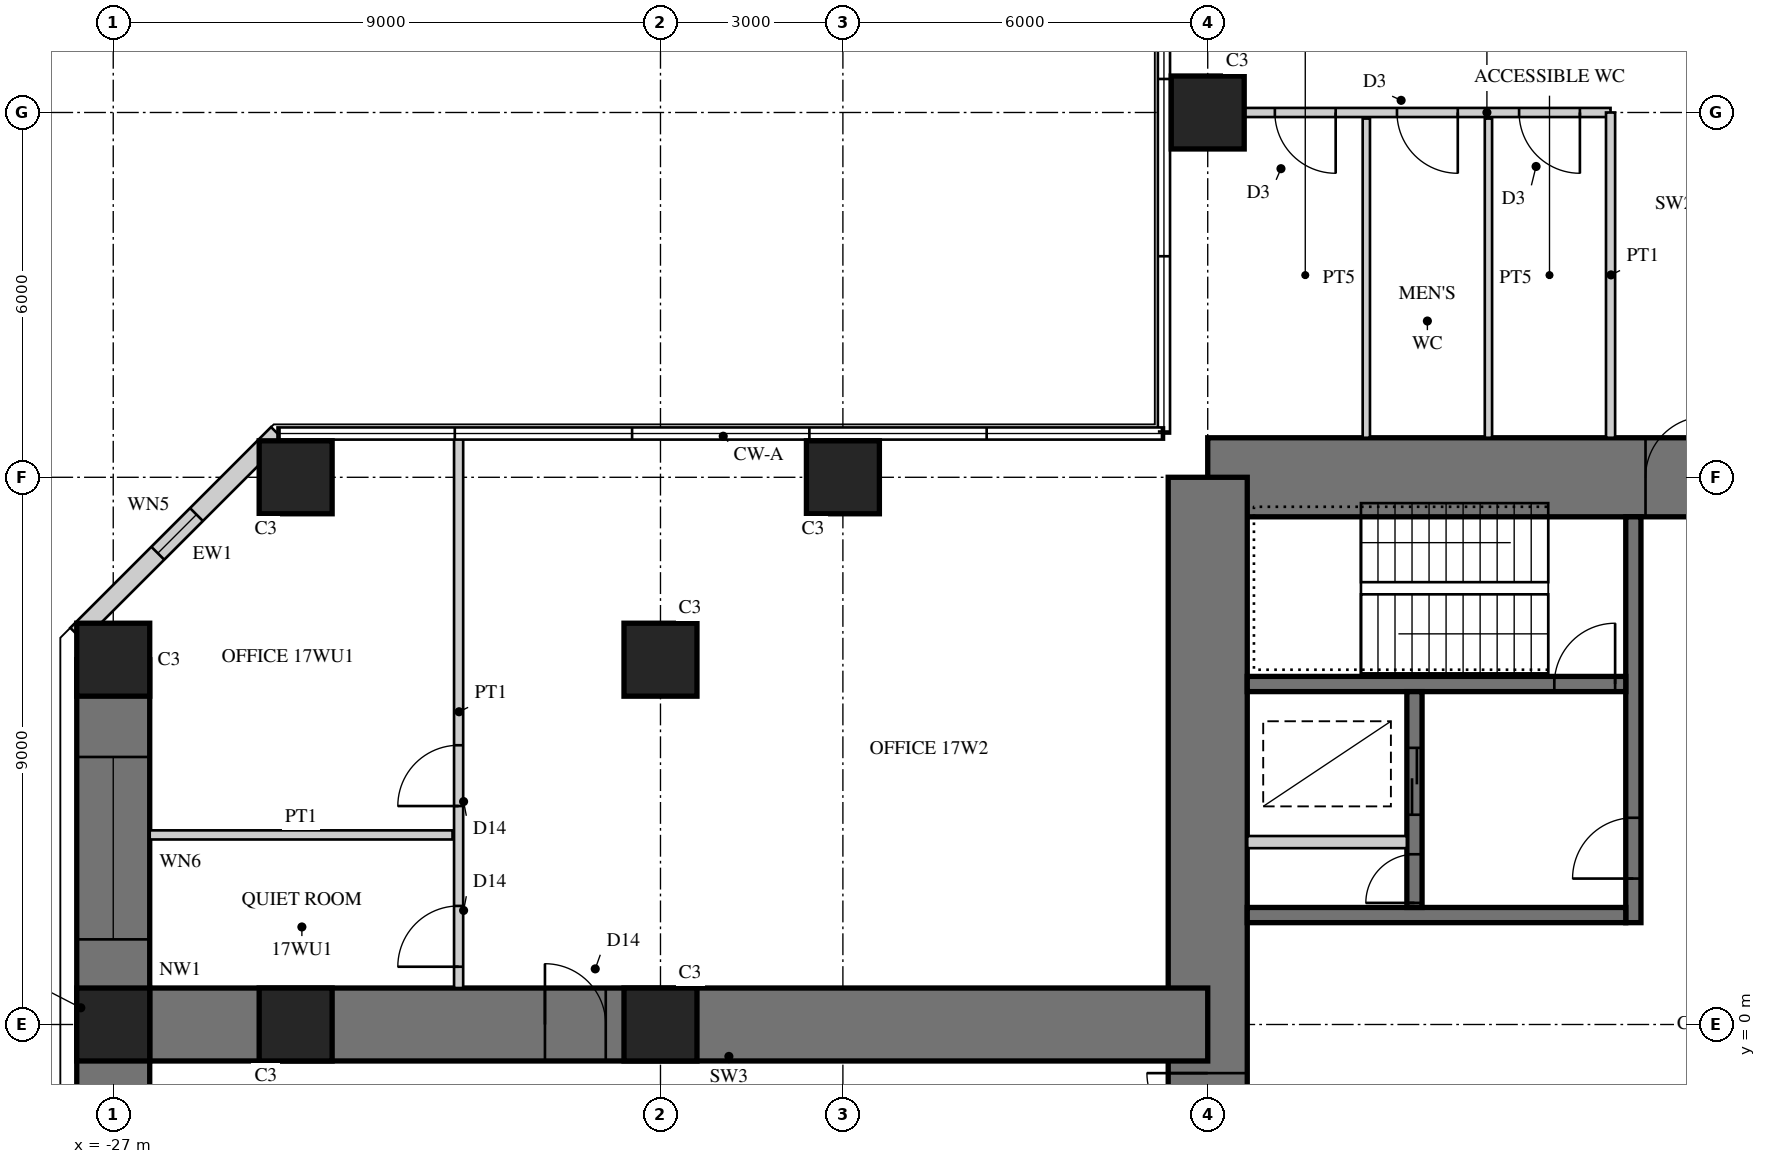
"""IFC4 building model, lengths in metres.
Left out: names, types, materials, properties, quantities, classifications, styles, units other than length and angle.
Written with IfcOpenShell. Run it as: python <this file> out.ifc"""

import sys

from ifc_helpers import new_model, si_unit, direction, frame, frame_2d, origin, origin_2d, place, context, subcontext, project, spatial, rectangle, hollow_rectangle, extrude, element, fill, save


model = new_model("IFC4")
c1 = context("Model", 3, precision=1e-05, world=origin(), true_north=direction((0.0, 1.0)))
c2 = subcontext(c1, "Body", "Model", "MODEL_VIEW")
j1 = project(units=[si_unit("LENGTHUNIT", "METRE"), si_unit("PLANEANGLEUNIT", "RADIAN")], contexts=[c1])
p1 = place(None, origin())
s1 = spatial("IfcSite", under=j1, at=p1, CompositionType="ELEMENT")
p2 = place(p1, origin())
s2 = spatial("IfcBuilding", under=s1, at=p2, CompositionType="ELEMENT")
p3 = place(p2, frame((0.0, 0.0, 71.5)))
s3 = spatial("IfcBuildingStorey", under=s2, at=p3, CompositionType="ELEMENT", Elevation=71.5)
p4 = place(p3, frame((9.0, 9.0, 0.0), z_axis=(0.0, 0.0, 1.0), x_axis=(-1.0, 0.0, 0.0)))
e1 = element("IfcWall", 1, at=p4, inside=s3, PredefinedType="SHEAR", context=c2, shape_type="SweptSolid", body=[
    extrude(rectangle(XDim=18.0, YDim=1.3, at=frame_2d((9.0, 0.0))), origin(), (0.0, 0.0, 1.0), 4.0),
])
p5 = place(p4, frame((9.8, 0.0, 0.0)))
e2 = element("IfcOpeningElement", 2, at=p5, cuts=e1, PredefinedType="OPENING", context=c2, shape_type="SweptSolid", body=[
    extrude(rectangle(XDim=1.0, YDim=2.4, at=frame_2d((0.5, 1.2))), frame((0.0, 0.66, 0.0), z_axis=(0.0, -1.0, 0.0), x_axis=(1.0, 0.0, 0.0)), (0.0, 0.0, 1.0), 1.32),
])
p6 = place(p3, frame((-9.0, 9.0, 0.0), z_axis=(0.0, 0.0, 1.0), x_axis=(0.0, -1.0, 0.0)))
e3 = element("IfcWall", 3, at=p6, inside=s3, PredefinedType="SHEAR", context=c2, shape_type="SweptSolid", body=[
    extrude(rectangle(XDim=18.0, YDim=1.3, at=frame_2d((9.0, 0.0))), origin(), (0.0, 0.0, 1.0), 4.0),
])
p7 = place(p6, frame((9.8, 0.0, 0.0)))
e4 = element("IfcOpeningElement", 4, at=p7, cuts=e3, PredefinedType="OPENING", context=c2, shape_type="SweptSolid", body=[
    extrude(rectangle(XDim=1.0, YDim=2.4, at=frame_2d((0.5, 1.2))), frame((0.0, 0.66, 0.0), z_axis=(0.0, -1.0, 0.0), x_axis=(1.0, 0.0, 0.0)), (0.0, 0.0, 1.0), 1.32),
])
p8 = place(p3, frame((-2.0, 1.675, 0.0), z_axis=(0.0, 0.0, 1.0), x_axis=(0.0, 1.0, 0.0)))
e5 = element("IfcWall", 5, at=p8, inside=s3, PredefinedType="SHEAR", context=c2, shape_type="SweptSolid", body=[
    extrude(rectangle(XDim=6.675, YDim=0.25, at=frame_2d((3.337, 0.0))), origin(), (0.0, 0.0, 1.0), 4.0),
])
p9 = place(p8, frame((0.725, 0.0, 0.0)))
e6 = element("IfcOpeningElement", 6, at=p9, cuts=e5, PredefinedType="OPENING", context=c2, shape_type="SweptSolid", body=[
    extrude(rectangle(XDim=1.0, YDim=2.1, at=frame_2d((0.5, 1.05))), frame((0.0, 0.135, 0.0), z_axis=(0.0, -1.0, 0.0), x_axis=(1.0, 0.0, 0.0)), (0.0, 0.0, 1.0), 0.27),
])
p10 = place(p3, frame((-2.125, 1.8, 0.0), z_axis=(0.0, 0.0, 1.0), x_axis=(-1.0, 0.0, 0.0)))
e7 = element("IfcWall", 7, at=p10, inside=s3, PredefinedType="SHEAR", context=c2, shape_type="SweptSolid", body=[
    extrude(rectangle(XDim=6.225, YDim=0.25, at=frame_2d((3.113, 0.0))), origin(), (0.0, 0.0, 1.0), 4.0),
])
p11 = place(p3, frame((-2.125, 5.6, 0.0), z_axis=(0.0, 0.0, 1.0), x_axis=(-1.0, 0.0, 0.0)))
e8 = element("IfcWall", 8, at=p11, inside=s3, PredefinedType="SHEAR", context=c2, shape_type="SweptSolid", body=[
    extrude(rectangle(XDim=6.225, YDim=0.25, at=frame_2d((3.113, 0.0))), origin(), (0.0, 0.0, 1.0), 4.0),
])
p12 = place(p11, frame((0.175, 0.0, 0.0)))
e9 = element("IfcOpeningElement", 9, at=p12, cuts=e8, PredefinedType="OPENING", context=c2, shape_type="SweptSolid", body=[
    extrude(rectangle(XDim=1.0, YDim=2.1, at=frame_2d((0.5, 1.05))), frame((0.0, 0.135, 0.0), z_axis=(0.0, -1.0, 0.0), x_axis=(1.0, 0.0, 0.0)), (0.0, 0.0, 1.0), 0.27),
])
p13 = place(p3, frame((-5.6, 1.925, 0.0), z_axis=(0.0, 0.0, 1.0), x_axis=(0.0, 1.0, 0.0)))
e10 = element("IfcWall", 10, at=p13, inside=s3, PredefinedType="SHEAR", context=c2, shape_type="SweptSolid", body=[
    extrude(rectangle(XDim=3.55, YDim=0.25, at=frame_2d((1.775, 0.0))), origin(), (0.0, 0.0, 1.0), 4.0),
])
p14 = place(p13, frame((1.525, 0.0, 0.0)))
e11 = element("IfcOpeningElement", 11, at=p14, cuts=e10, PredefinedType="OPENING", context=c2, shape_type="SweptSolid", body=[
    extrude(rectangle(XDim=1.1, YDim=2.2, at=frame_2d((0.55, 1.1))), frame((0.0, 0.135, 0.0), z_axis=(0.0, -1.0, 0.0), x_axis=(1.0, 0.0, 0.0)), (0.0, 0.0, 1.0), 0.27),
])
p15 = place(p13, frame((0.075, 0.0, 0.0)))
e12 = element("IfcOpeningElement", 12, at=p15, cuts=e10, PredefinedType="OPENING", context=c2, shape_type="SweptSolid", body=[
    extrude(rectangle(XDim=0.8, YDim=2.1, at=frame_2d((0.4, 1.05))), frame((0.0, 0.135, 0.0), z_axis=(0.0, -1.0, 0.0), x_axis=(1.0, 0.0, 0.0)), (0.0, 0.0, 1.0), 0.27),
])
p16 = place(p3, frame((-5.725, 3.0, 0.0), z_axis=(0.0, 0.0, 1.0), x_axis=(-1.0, 0.0, 0.0)))
e13 = element("IfcWall", 13, at=p16, inside=s3, PredefinedType="PARTITIONING", context=c2, shape_type="SweptSolid", body=[
    extrude(rectangle(XDim=2.625, YDim=0.2, at=frame_2d((1.312, 0.0))), origin(), (0.0, 0.0, 1.0), 4.0),
])
p17 = place(p3, frame((-9.0, 0.0, 0.0), z_axis=(0.0, 0.0, 1.0), x_axis=(-1.0, 0.0, 0.0)))
e14 = element("IfcWall", 14, at=p17, inside=s3, PredefinedType="SHEAR", context=c2, shape_type="SweptSolid", body=[
    extrude(rectangle(XDim=18.0, YDim=1.2, at=frame_2d((9.0, 0.0))), origin(), (0.0, 0.0, 1.0), 4.0),
])
p18 = place(p17, frame((9.9, 0.0, 0.0)))
e15 = element("IfcOpeningElement", 15, at=p18, cuts=e14, PredefinedType="OPENING", context=c2, shape_type="SweptSolid", body=[
    extrude(rectangle(XDim=1.0, YDim=2.2, at=frame_2d((0.5, 1.1))), frame((0.0, 0.61, 0.0), z_axis=(0.0, -1.0, 0.0), x_axis=(1.0, 0.0, 0.0)), (0.0, 0.0, 1.0), 1.22),
])
p19 = place(p3, frame((-27.0, 6.0, 0.0), z_axis=(0.0, 0.0, 1.0), x_axis=(0.0, -1.0, 0.0)))
e16 = element("IfcWall", 16, at=p19, inside=s3, PredefinedType="SHEAR", context=c2, shape_type="SweptSolid", body=[
    extrude(rectangle(XDim=12.0, YDim=1.2, at=frame_2d((6.0, 0.0))), origin(), (0.0, 0.0, 1.0), 4.0),
])
p20 = place(p19, frame((1.6, 0.0, 0.6)))
e17 = element("IfcOpeningElement", 17, at=p20, cuts=e16, PredefinedType="OPENING", context=c2, shape_type="SweptSolid", body=[
    extrude(rectangle(XDim=3.0, YDim=2.4, at=frame_2d((1.5, 1.2))), frame((0.0, 0.61, 0.0), z_axis=(0.0, -1.0, 0.0), x_axis=(1.0, 0.0, 0.0)), (0.0, 0.0, 1.0), 1.22),
])
p21 = place(p19, frame((7.4, 0.0, 0.6)))
e18 = element("IfcOpeningElement", 18, at=p21, cuts=e16, PredefinedType="OPENING", context=c2, shape_type="SweptSolid", body=[
    extrude(rectangle(XDim=3.0, YDim=2.4, at=frame_2d((1.5, 1.2))), frame((0.0, 0.61, 0.0), z_axis=(0.0, -1.0, 0.0), x_axis=(1.0, 0.0, 0.0)), (0.0, 0.0, 1.0), 1.22),
])
for number, where, z_axis, x_axis in (
    (19, (-9.0, 15.0, 0.0), (0.0, 0.0, 1.0), (1.0, 0.0, 0.0)),
    (20, (-15.0, 9.0, 0.0), (0.0, 0.0, 1.0), (1.0, 0.0, 0.0)),
    (21, (-24.0, 9.0, 0.0), (0.0, 0.0, 1.0), (1.0, 0.0, 0.0)),
    (22, (-27.0, 6.0, 0.0), (0.0, 0.0, 1.0), (1.0, 0.0, 0.0)),
    (23, (-27.0, 0.0, 0.0), (0.0, 0.0, 1.0), (1.0, 0.0, 0.0)),
    (24, (-18.0, 6.0, 0.0), (0.0, 0.0, 1.0), (1.0, 0.0, 0.0)),
    (25, (-18.0, 0.0, 0.0), (0.0, 0.0, 1.0), (1.0, 0.0, 0.0)),
    (26, (-24.0, 0.0, 0.0), (0.0, 0.0, 1.0), (1.0, 0.0, 0.0)),
):
    element("IfcColumn", number, at=place(p3, frame(where, z_axis=z_axis, x_axis=x_axis)), inside=s3, PredefinedType="COLUMN", context=c2, shape_type="SweptSolid", body=[
        extrude(rectangle(XDim=1.2, YDim=1.2, at=origin_2d()), origin(), (0.0, 0.0, 1.0), 4.0),
    ])
p22 = place(p3, frame((-24.298, 9.72, 0.0), z_axis=(0.0, 0.0, 1.0), x_axis=(-0.707106781187, -0.707106781187, 0.0)))
e27 = element("IfcWall", 27, at=p22, inside=s3, PredefinedType="SOLIDWALL", context=c2, shape_type="SweptSolid", body=[
    extrude(rectangle(XDim=4.669, YDim=0.3, at=frame_2d((2.335, 0.0))), origin(), (0.0, 0.0, 1.0), 3.8),
])
p23 = place(p22, frame((1.885, 0.0, 0.3)))
e28 = element("IfcOpeningElement", 28, at=p23, cuts=e27, PredefinedType="OPENING", context=c2, shape_type="SweptSolid", body=[
    extrude(rectangle(XDim=0.9, YDim=2.4, at=frame_2d((0.45, 1.2))), frame((0.0, 0.16, 0.0), z_axis=(0.0, -1.0, 0.0), x_axis=(1.0, 0.0, 0.0)), (0.0, 0.0, 1.0), 0.32),
])
p24 = place(p3, frame((-2.375, 15.0, 0.0), z_axis=(0.0, 0.0, 1.0), x_axis=(-1.0, 0.0, 0.0)))
e29 = element("IfcWall", 29, at=p24, inside=s3, PredefinedType="PARTITIONING", context=c2, shape_type="SweptSolid", body=[
    extrude(rectangle(XDim=6.025, YDim=0.15, at=frame_2d((3.012, 0.0))), origin(), (0.0, 0.0, 1.0), 2.95),
])
p25 = place(p24, frame((0.504, 0.0, 0.0)))
e30 = element("IfcOpeningElement", 30, at=p25, cuts=e29, PredefinedType="OPENING", context=c2, shape_type="SweptSolid", body=[
    extrude(rectangle(XDim=1.0, YDim=2.1, at=frame_2d((0.5, 1.05))), frame((0.0, 0.085, 0.0), z_axis=(0.0, -1.0, 0.0), x_axis=(1.0, 0.0, 0.0)), (0.0, 0.0, 1.0), 0.17),
])
p26 = place(p24, frame((2.512, 0.0, 0.0)))
e31 = element("IfcOpeningElement", 31, at=p26, cuts=e29, PredefinedType="OPENING", context=c2, shape_type="SweptSolid", body=[
    extrude(rectangle(XDim=1.0, YDim=2.1, at=frame_2d((0.5, 1.05))), frame((0.0, 0.085, 0.0), z_axis=(0.0, -1.0, 0.0), x_axis=(1.0, 0.0, 0.0)), (0.0, 0.0, 1.0), 0.17),
])
p27 = place(p24, frame((4.521, 0.0, 0.0)))
e32 = element("IfcOpeningElement", 32, at=p27, cuts=e29, PredefinedType="OPENING", context=c2, shape_type="SweptSolid", body=[
    extrude(rectangle(XDim=1.0, YDim=2.1, at=frame_2d((0.5, 1.05))), frame((0.0, 0.085, 0.0), z_axis=(0.0, -1.0, 0.0), x_axis=(1.0, 0.0, 0.0)), (0.0, 0.0, 1.0), 0.17),
])
p28 = place(p3, frame((-2.375, 9.65, 0.0), z_axis=(0.0, 0.0, 1.0), x_axis=(0.0, 1.0, 0.0)))
e33 = element("IfcWall", 33, at=p28, inside=s3, PredefinedType="PARTITIONING", context=c2, shape_type="SweptSolid", body=[
    extrude(rectangle(XDim=5.35, YDim=0.15, at=frame_2d((2.675, 0.0))), origin(), (0.0, 0.0, 1.0), 3.8),
])
for number, where, z_axis, x_axis in (
    (34, (-4.383, 9.65, 0.0), (0.0, 0.0, 1.0), (0.0, 1.0, 0.0)),
    (35, (-6.392, 9.65, 0.0), (0.0, 0.0, 1.0), (0.0, 1.0, 0.0)),
):
    element("IfcWall", number, at=place(p3, frame(where, z_axis=z_axis, x_axis=x_axis)), inside=s3, PredefinedType="PLUMBINGWALL", context=c2, shape_type="SweptSolid", body=[
        extrude(rectangle(XDim=5.25, YDim=0.12, at=frame_2d((2.625, 0.0))), origin(), (0.0, 0.0, 1.0), 3.8),
    ])
p29 = place(p3, frame((-21.42, 3.118, 0.0), z_axis=(0.0, 0.0, 1.0), x_axis=(-1.0, 0.0, 0.0)))
e36 = element("IfcWall", 36, at=p29, inside=s3, PredefinedType="PARTITIONING", context=c2, shape_type="SweptSolid", body=[
    extrude(rectangle(XDim=4.98, YDim=0.15, at=frame_2d((2.49, 0.0))), origin(), (0.0, 0.0, 1.0), 3.8),
])
p30 = place(p3, frame((-21.32, 9.68, 0.0), z_axis=(0.0, 0.0, 1.0), x_axis=(0.0, -1.0, 0.0)))
e37 = element("IfcWall", 37, at=p30, inside=s3, PredefinedType="PARTITIONING", context=c2, shape_type="SweptSolid", body=[
    extrude(rectangle(XDim=9.08, YDim=0.15, at=frame_2d((4.54, 0.0))), origin(), (0.0, 0.0, 1.0), 3.8),
])
p31 = place(p30, frame((5.087, 0.0, 0.0)))
e38 = element("IfcOpeningElement", 38, at=p31, cuts=e37, PredefinedType="OPENING", context=c2, shape_type="SweptSolid", body=[
    extrude(rectangle(XDim=1.0, YDim=2.2, at=frame_2d((0.5, 1.1))), frame((0.0, 0.085, 0.0), z_axis=(0.0, -1.0, 0.0), x_axis=(1.0, 0.0, 0.0)), (0.0, 0.0, 1.0), 0.17),
])
p32 = place(p30, frame((7.73, 0.0, 0.0)))
e39 = element("IfcOpeningElement", 39, at=p32, cuts=e37, PredefinedType="OPENING", context=c2, shape_type="SweptSolid", body=[
    extrude(rectangle(XDim=1.0, YDim=2.2, at=frame_2d((0.5, 1.1))), frame((0.0, 0.085, 0.0), z_axis=(0.0, -1.0, 0.0), x_axis=(1.0, 0.0, 0.0)), (0.0, 0.0, 1.0), 0.17),
])
p33 = place(p23, origin())
e40 = element("IfcWindow", 40, at=p33, inside=s3, PartitioningType="SINGLE_PANEL", PredefinedType="WINDOW", context=c2, shape_type="SweptSolid", body=[
    extrude(hollow_rectangle(XDim=0.9, YDim=2.4, WallThickness=0.06, at=frame_2d((0.45, 1.2))), frame((0.0, 0.03, 0.0), z_axis=(0.0, -1.0, 0.0), x_axis=(1.0, 0.0, 0.0)), (0.0, 0.0, 1.0), 0.06),
    extrude(rectangle(XDim=0.779, YDim=2.279, at=frame_2d((0.45, 1.2))), frame((0.0, 0.03, 0.0), z_axis=(0.0, -1.0, 0.0), x_axis=(1.0, 0.0, 0.0)), (0.0, 0.0, 1.0), 0.06),
])
fill(e28, e40)
p34 = place(p20, origin())
e41 = element("IfcWindow", 41, at=p34, inside=s3, PartitioningType="SINGLE_PANEL", PredefinedType="WINDOW", context=c2, shape_type="SweptSolid", body=[
    extrude(hollow_rectangle(XDim=3.0, YDim=2.4, WallThickness=0.06, at=frame_2d((1.5, 1.2))), frame((0.0, 0.03, 0.0), z_axis=(0.0, -1.0, 0.0), x_axis=(1.0, 0.0, 0.0)), (0.0, 0.0, 1.0), 0.06),
    extrude(rectangle(XDim=2.879, YDim=2.279, at=frame_2d((1.5, 1.2))), frame((0.0, 0.03, 0.0), z_axis=(0.0, -1.0, 0.0), x_axis=(1.0, 0.0, 0.0)), (0.0, 0.0, 1.0), 0.06),
])
fill(e17, e41)
p35 = place(p25, origin())
e42 = element("IfcDoor", 42, at=p35, inside=s3, OperationType="SINGLE_SWING_LEFT", PredefinedType="DOOR", context=c2, shape_type="SweptSolid", body=[
    extrude(rectangle(XDim=1.0, YDim=2.1, at=frame_2d((0.5, 1.05))), frame((0.0, 0.025, 0.0), z_axis=(0.0, -1.0, 0.0), x_axis=(1.0, 0.0, 0.0)), (0.0, 0.0, 1.0), 0.05),
])
fill(e30, e42)
p36 = place(p26, origin())
e43 = element("IfcDoor", 43, at=p36, inside=s3, OperationType="SINGLE_SWING_LEFT", PredefinedType="DOOR", context=c2, shape_type="SweptSolid", body=[
    extrude(rectangle(XDim=1.0, YDim=2.1, at=frame_2d((0.5, 1.05))), frame((0.0, 0.025, 0.0), z_axis=(0.0, -1.0, 0.0), x_axis=(1.0, 0.0, 0.0)), (0.0, 0.0, 1.0), 0.05),
])
fill(e31, e43)
p37 = place(p27, origin())
e44 = element("IfcDoor", 44, at=p37, inside=s3, OperationType="SINGLE_SWING_LEFT", PredefinedType="DOOR", context=c2, shape_type="SweptSolid", body=[
    extrude(rectangle(XDim=1.0, YDim=2.1, at=frame_2d((0.5, 1.05))), frame((0.0, 0.025, 0.0), z_axis=(0.0, -1.0, 0.0), x_axis=(1.0, 0.0, 0.0)), (0.0, 0.0, 1.0), 0.05),
])
fill(e32, e44)
p38 = place(p31, frame((1.0, 0.0, 0.0), z_axis=(0.0, 0.0, 1.0), x_axis=(-1.0, 0.0, 0.0)))
e45 = element("IfcDoor", 45, at=p38, inside=s3, OperationType="SINGLE_SWING_LEFT", PredefinedType="DOOR", context=c2, shape_type="SweptSolid", body=[
    extrude(rectangle(XDim=1.0, YDim=2.2, at=frame_2d((0.5, 1.1))), frame((0.0, 0.025, 0.0), z_axis=(0.0, -1.0, 0.0), x_axis=(1.0, 0.0, 0.0)), (0.0, 0.0, 1.0), 0.05),
])
fill(e38, e45)
p39 = place(p32, frame((1.0, 0.0, 0.0), z_axis=(0.0, 0.0, 1.0), x_axis=(-1.0, 0.0, 0.0)))
e46 = element("IfcDoor", 46, at=p39, inside=s3, OperationType="SINGLE_SWING_LEFT", PredefinedType="DOOR", context=c2, shape_type="SweptSolid", body=[
    extrude(rectangle(XDim=1.0, YDim=2.2, at=frame_2d((0.5, 1.1))), frame((0.0, 0.025, 0.0), z_axis=(0.0, -1.0, 0.0), x_axis=(1.0, 0.0, 0.0)), (0.0, 0.0, 1.0), 0.05),
])
fill(e39, e46)
p40 = place(p18, frame((1.0, 0.0, 0.0), z_axis=(0.0, 0.0, 1.0), x_axis=(-1.0, 0.0, 0.0)))
e47 = element("IfcDoor", 47, at=p40, inside=s3, OperationType="SINGLE_SWING_LEFT", PredefinedType="DOOR", context=c2, shape_type="SweptSolid", body=[
    extrude(rectangle(XDim=1.0, YDim=2.2, at=frame_2d((0.5, 1.1))), frame((0.0, 0.025, 0.0), z_axis=(0.0, -1.0, 0.0), x_axis=(1.0, 0.0, 0.0)), (0.0, 0.0, 1.0), 0.05),
])
fill(e15, e47)
p41 = place(p5, frame((1.0, 0.0, 0.0), z_axis=(0.0, 0.0, 1.0), x_axis=(-1.0, 0.0, 0.0)))
e48 = element("IfcDoor", 48, at=p41, inside=s3, OperationType="SINGLE_SWING_RIGHT", PredefinedType="DOOR", context=c2, shape_type="SweptSolid", body=[
    extrude(rectangle(XDim=1.0, YDim=2.4, at=frame_2d((0.5, 1.2))), frame((0.0, -0.005, 0.0), z_axis=(0.0, -1.0, 0.0), x_axis=(1.0, 0.0, 0.0)), (0.0, 0.0, 1.0), 0.05),
])
fill(e2, e48)
p42 = place(p7, frame((1.0, 0.0, 0.0), z_axis=(0.0, 0.0, 1.0), x_axis=(-1.0, 0.0, 0.0)))
e49 = element("IfcDoor", 49, at=p42, inside=s3, OperationType="SINGLE_SWING_RIGHT", PredefinedType="DOOR", context=c2, shape_type="SweptSolid", body=[
    extrude(rectangle(XDim=1.0, YDim=2.4, at=frame_2d((0.5, 1.2))), frame((0.0, -0.005, 0.0), z_axis=(0.0, -1.0, 0.0), x_axis=(1.0, 0.0, 0.0)), (0.0, 0.0, 1.0), 0.05),
])
fill(e4, e49)
p43 = place(p9, origin())
e50 = element("IfcDoor", 50, at=p43, inside=s3, OperationType="SINGLE_SWING_LEFT", PredefinedType="DOOR", context=c2, shape_type="SweptSolid", body=[
    extrude(rectangle(XDim=1.0, YDim=2.1, at=frame_2d((0.5, 1.05))), frame((0.0, 0.025, 0.0), z_axis=(0.0, -1.0, 0.0), x_axis=(1.0, 0.0, 0.0)), (0.0, 0.0, 1.0), 0.05),
])
fill(e6, e50)
p44 = place(p12, frame((1.0, 0.0, 0.0), z_axis=(0.0, 0.0, 1.0), x_axis=(-1.0, 0.0, 0.0)))
e51 = element("IfcDoor", 51, at=p44, inside=s3, OperationType="SINGLE_SWING_RIGHT", PredefinedType="DOOR", context=c2, shape_type="SweptSolid", body=[
    extrude(rectangle(XDim=1.0, YDim=2.1, at=frame_2d((0.5, 1.05))), frame((0.0, 0.025, 0.0), z_axis=(0.0, -1.0, 0.0), x_axis=(1.0, 0.0, 0.0)), (0.0, 0.0, 1.0), 0.05),
])
fill(e9, e51)
p45 = place(p14, origin())
e52 = element("IfcDoor", 52, at=p45, inside=s3, OperationType="DOUBLE_DOOR_SLIDING", PredefinedType="DOOR", context=c2, shape_type="SweptSolid", body=[
    extrude(rectangle(XDim=1.1, YDim=2.2, at=frame_2d((0.55, 1.1))), frame((0.0, 0.025, 0.0), z_axis=(0.0, -1.0, 0.0), x_axis=(1.0, 0.0, 0.0)), (0.0, 0.0, 1.0), 0.05),
])
fill(e11, e52)
p46 = place(p15, origin())
e53 = element("IfcDoor", 53, at=p46, inside=s3, OperationType="SINGLE_SWING_LEFT", PredefinedType="DOOR", context=c2, shape_type="SweptSolid", body=[
    extrude(rectangle(XDim=0.8, YDim=2.1, at=frame_2d((0.4, 1.05))), frame((0.0, 0.025, 0.0), z_axis=(0.0, -1.0, 0.0), x_axis=(1.0, 0.0, 0.0)), (0.0, 0.0, 1.0), 0.05),
])
fill(e12, e53)
save(model, sys.argv[1])
